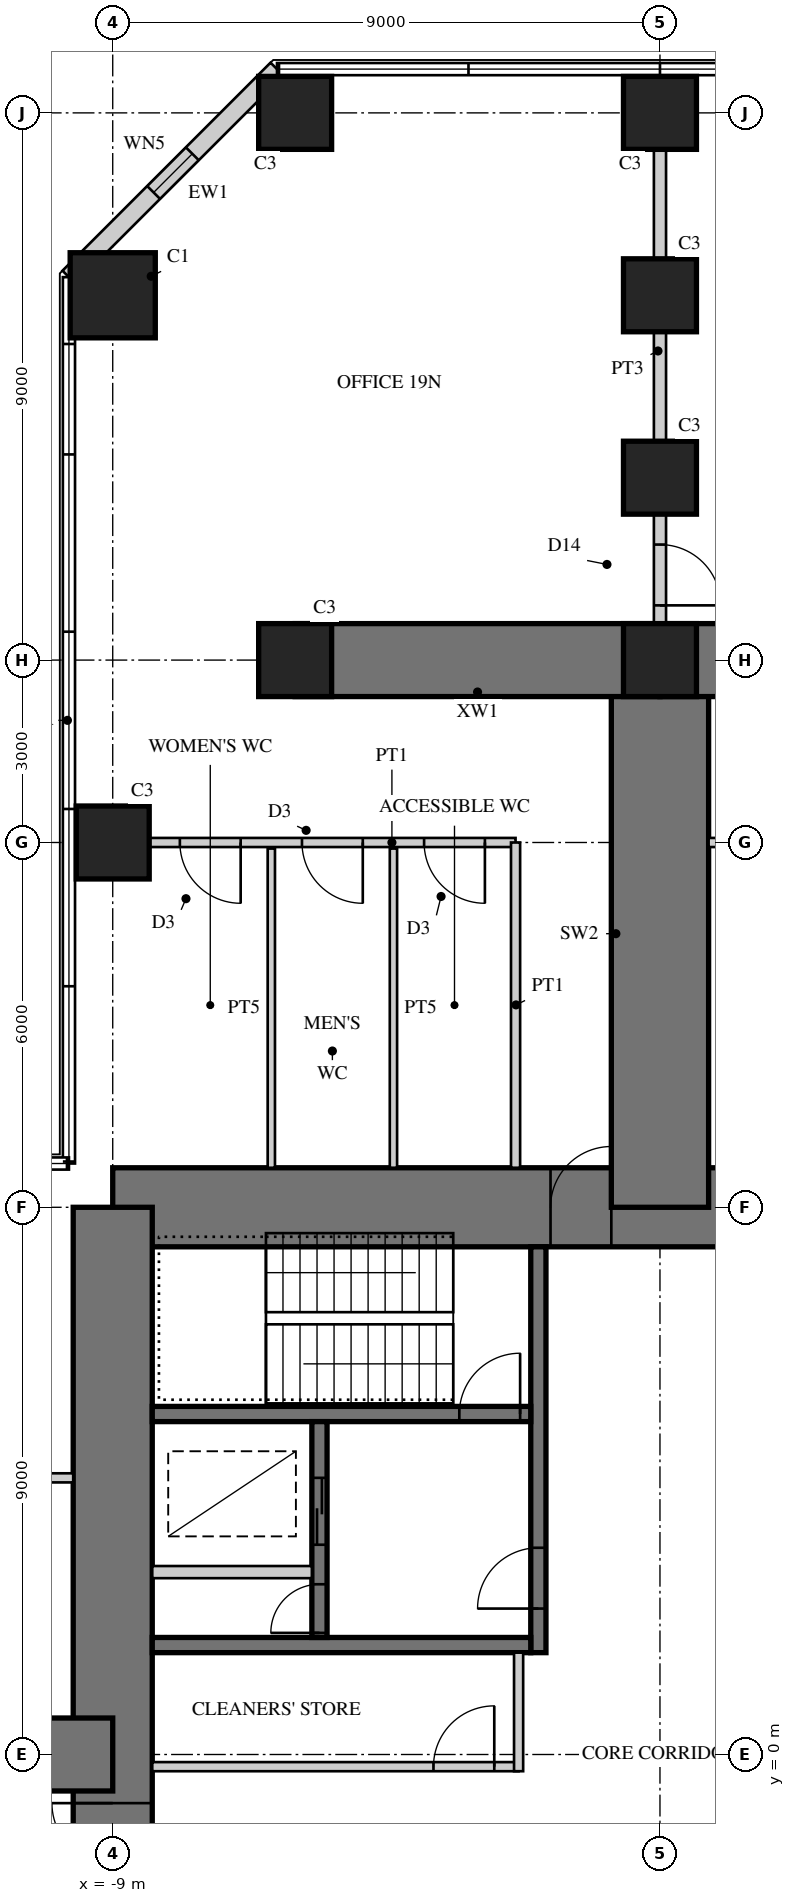
"""IFC4 building model, lengths in metres.
Left out: names, types, materials, properties, quantities, classifications, styles, units other than length and angle.
Written with IfcOpenShell. Run it as: python <this file> out.ifc"""

import sys

from ifc_helpers import new_model, si_unit, direction, frame, frame_2d, origin, origin_2d, place, context, subcontext, project, spatial, rectangle, hollow_rectangle, extrude, element, fill, save


model = new_model("IFC4")
c1 = context("Model", 3, precision=1e-05, world=origin(), true_north=direction((0.0, 1.0)))
c2 = subcontext(c1, "Body", "Model", "MODEL_VIEW")
j1 = project(units=[si_unit("LENGTHUNIT", "METRE"), si_unit("PLANEANGLEUNIT", "RADIAN")], contexts=[c1])
p1 = place(None, origin())
s1 = spatial("IfcSite", under=j1, at=p1, CompositionType="ELEMENT")
p2 = place(p1, origin())
s2 = spatial("IfcBuilding", under=s1, at=p2, CompositionType="ELEMENT")
p3 = place(p2, frame((0.0, 0.0, 79.5)))
s3 = spatial("IfcBuildingStorey", under=s2, at=p3, CompositionType="ELEMENT", Elevation=79.5)
p4 = place(p3, frame((9.0, 9.0, 0.0), z_axis=(0.0, 0.0, 1.0), x_axis=(-1.0, 0.0, 0.0)))
e1 = element("IfcWall", 1, at=p4, inside=s3, PredefinedType="SHEAR", context=c2, shape_type="SweptSolid", body=[
    extrude(rectangle(XDim=18.0, YDim=1.3, at=frame_2d((9.0, 0.0))), origin(), (0.0, 0.0, 1.0), 4.0),
])
p5 = place(p4, frame((9.8, 0.0, 0.0)))
e2 = element("IfcOpeningElement", 2, at=p5, cuts=e1, PredefinedType="OPENING", context=c2, shape_type="SweptSolid", body=[
    extrude(rectangle(XDim=1.0, YDim=2.4, at=frame_2d((0.5, 1.2))), frame((0.0, 0.66, 0.0), z_axis=(0.0, -1.0, 0.0), x_axis=(1.0, 0.0, 0.0)), (0.0, 0.0, 1.0), 1.32),
])
p6 = place(p3, frame((-9.0, 9.0, 0.0), z_axis=(0.0, 0.0, 1.0), x_axis=(0.0, -1.0, 0.0)))
e3 = element("IfcWall", 3, at=p6, inside=s3, PredefinedType="SHEAR", context=c2, shape_type="SweptSolid", body=[
    extrude(rectangle(XDim=18.0, YDim=1.3, at=frame_2d((9.0, 0.0))), origin(), (0.0, 0.0, 1.0), 4.0),
])
p7 = place(p6, frame((9.8, 0.0, 0.0)))
e4 = element("IfcOpeningElement", 4, at=p7, cuts=e3, PredefinedType="OPENING", context=c2, shape_type="SweptSolid", body=[
    extrude(rectangle(XDim=1.0, YDim=2.4, at=frame_2d((0.5, 1.2))), frame((0.0, 0.66, 0.0), z_axis=(0.0, -1.0, 0.0), x_axis=(1.0, 0.0, 0.0)), (0.0, 0.0, 1.0), 1.32),
])
p8 = place(p3, frame((-2.0, 1.675, 0.0), z_axis=(0.0, 0.0, 1.0), x_axis=(0.0, 1.0, 0.0)))
e5 = element("IfcWall", 5, at=p8, inside=s3, PredefinedType="SHEAR", context=c2, shape_type="SweptSolid", body=[
    extrude(rectangle(XDim=6.675, YDim=0.25, at=frame_2d((3.337, 0.0))), origin(), (0.0, 0.0, 1.0), 4.0),
])
p9 = place(p8, frame((0.725, 0.0, 0.0)))
e6 = element("IfcOpeningElement", 6, at=p9, cuts=e5, PredefinedType="OPENING", context=c2, shape_type="SweptSolid", body=[
    extrude(rectangle(XDim=1.0, YDim=2.1, at=frame_2d((0.5, 1.05))), frame((0.0, 0.135, 0.0), z_axis=(0.0, -1.0, 0.0), x_axis=(1.0, 0.0, 0.0)), (0.0, 0.0, 1.0), 0.27),
])
p10 = place(p3, frame((-2.125, 1.8, 0.0), z_axis=(0.0, 0.0, 1.0), x_axis=(-1.0, 0.0, 0.0)))
e7 = element("IfcWall", 7, at=p10, inside=s3, PredefinedType="SHEAR", context=c2, shape_type="SweptSolid", body=[
    extrude(rectangle(XDim=6.225, YDim=0.25, at=frame_2d((3.113, 0.0))), origin(), (0.0, 0.0, 1.0), 4.0),
])
p11 = place(p3, frame((-2.125, 5.6, 0.0), z_axis=(0.0, 0.0, 1.0), x_axis=(-1.0, 0.0, 0.0)))
e8 = element("IfcWall", 8, at=p11, inside=s3, PredefinedType="SHEAR", context=c2, shape_type="SweptSolid", body=[
    extrude(rectangle(XDim=6.225, YDim=0.25, at=frame_2d((3.113, 0.0))), origin(), (0.0, 0.0, 1.0), 4.0),
])
p12 = place(p11, frame((0.175, 0.0, 0.0)))
e9 = element("IfcOpeningElement", 9, at=p12, cuts=e8, PredefinedType="OPENING", context=c2, shape_type="SweptSolid", body=[
    extrude(rectangle(XDim=1.0, YDim=2.1, at=frame_2d((0.5, 1.05))), frame((0.0, 0.135, 0.0), z_axis=(0.0, -1.0, 0.0), x_axis=(1.0, 0.0, 0.0)), (0.0, 0.0, 1.0), 0.27),
])
p13 = place(p3, frame((-5.6, 1.925, 0.0), z_axis=(0.0, 0.0, 1.0), x_axis=(0.0, 1.0, 0.0)))
e10 = element("IfcWall", 10, at=p13, inside=s3, PredefinedType="SHEAR", context=c2, shape_type="SweptSolid", body=[
    extrude(rectangle(XDim=3.55, YDim=0.25, at=frame_2d((1.775, 0.0))), origin(), (0.0, 0.0, 1.0), 4.0),
])
p14 = place(p13, frame((1.525, 0.0, 0.0)))
e11 = element("IfcOpeningElement", 11, at=p14, cuts=e10, PredefinedType="OPENING", context=c2, shape_type="SweptSolid", body=[
    extrude(rectangle(XDim=1.1, YDim=2.2, at=frame_2d((0.55, 1.1))), frame((0.0, 0.135, 0.0), z_axis=(0.0, -1.0, 0.0), x_axis=(1.0, 0.0, 0.0)), (0.0, 0.0, 1.0), 0.27),
])
p15 = place(p13, frame((0.075, 0.0, 0.0)))
e12 = element("IfcOpeningElement", 12, at=p15, cuts=e10, PredefinedType="OPENING", context=c2, shape_type="SweptSolid", body=[
    extrude(rectangle(XDim=0.8, YDim=2.1, at=frame_2d((0.4, 1.05))), frame((0.0, 0.135, 0.0), z_axis=(0.0, -1.0, 0.0), x_axis=(1.0, 0.0, 0.0)), (0.0, 0.0, 1.0), 0.27),
])
p16 = place(p3, frame((-5.725, 3.0, 0.0), z_axis=(0.0, 0.0, 1.0), x_axis=(-1.0, 0.0, 0.0)))
e13 = element("IfcWall", 13, at=p16, inside=s3, PredefinedType="PARTITIONING", context=c2, shape_type="SweptSolid", body=[
    extrude(rectangle(XDim=2.625, YDim=0.2, at=frame_2d((1.312, 0.0))), origin(), (0.0, 0.0, 1.0), 4.0),
])
p17 = place(p3, frame((0.0, 9.0, 0.0), z_axis=(0.0, 0.0, 1.0), x_axis=(0.0, 1.0, 0.0)))
e14 = element("IfcWall", 14, at=p17, inside=s3, PredefinedType="SHEAR", context=c2, shape_type="SweptSolid", body=[
    extrude(rectangle(XDim=9.0, YDim=1.6, at=frame_2d((4.5, 0.0))), origin(), (0.0, 0.0, 1.0), 4.0),
])
for number, where, z_axis, x_axis in (
    (15, (0.0, 18.0, 0.0), (0.0, 0.0, 1.0), (-1.0, 0.0, 0.0)),
    (16, (0.0, 18.0, 0.0), (0.0, 0.0, 1.0), (1.0, 0.0, 0.0)),
):
    element("IfcWall", number, at=place(p3, frame(where, z_axis=z_axis, x_axis=x_axis)), inside=s3, PredefinedType="SHEAR", context=c2, shape_type="SweptSolid", body=[
        extrude(rectangle(XDim=6.0, YDim=1.2, at=frame_2d((3.0, 0.0))), origin(), (0.0, 0.0, 1.0), 4.0),
    ])
p18 = place(p3, frame((-9.0, 0.0, 0.0), z_axis=(0.0, 0.0, 1.0), x_axis=(-1.0, 0.0, 0.0)))
e17 = element("IfcWall", 17, at=p18, inside=s3, PredefinedType="SHEAR", context=c2, shape_type="SweptSolid", body=[
    extrude(rectangle(XDim=18.0, YDim=1.2, at=frame_2d((9.0, 0.0))), origin(), (0.0, 0.0, 1.0), 4.0),
])
p19 = place(p18, frame((9.9, 0.0, 0.0)))
e18 = element("IfcOpeningElement", 18, at=p19, cuts=e17, PredefinedType="OPENING", context=c2, shape_type="SweptSolid", body=[
    extrude(rectangle(XDim=1.0, YDim=2.2, at=frame_2d((0.5, 1.1))), frame((0.0, 0.61, 0.0), z_axis=(0.0, -1.0, 0.0), x_axis=(1.0, 0.0, 0.0)), (0.0, 0.0, 1.0), 1.22),
])
p20 = place(p3, frame((-9.0, 15.0, 0.0), z_axis=(0.0, 0.0, 1.0), x_axis=(1.0, 0.0, 0.0)))
e19 = element("IfcColumn", 19, at=p20, inside=s3, PredefinedType="COLUMN", context=c2, shape_type="SweptSolid", body=[
    extrude(rectangle(XDim=1.2, YDim=1.2, at=origin_2d()), origin(), (0.0, 0.0, 1.0), 4.0),
])
p21 = place(p3, frame((-9.0, 24.0, 0.0), z_axis=(0.0, 0.0, 1.0), x_axis=(1.0, 0.0, 0.0)))
e20 = element("IfcColumn", 20, at=p21, inside=s3, PredefinedType="COLUMN", context=c2, shape_type="SweptSolid", body=[
    extrude(rectangle(XDim=1.4, YDim=1.4, at=origin_2d()), origin(), (0.0, 0.0, 1.0), 4.0),
])
for number, where, z_axis, x_axis in (
    (21, (0.0, 27.0, 0.0), (0.0, 0.0, 1.0), (1.0, 0.0, 0.0)),
    (22, (-6.0, 27.0, 0.0), (0.0, 0.0, 1.0), (1.0, 0.0, 0.0)),
    (23, (0.0, 18.0, 0.0), (0.0, 0.0, 1.0), (1.0, 0.0, 0.0)),
    (24, (-6.0, 18.0, 0.0), (0.0, 0.0, 1.0), (1.0, 0.0, 0.0)),
    (25, (0.0, 21.0, 0.0), (0.0, 0.0, 1.0), (1.0, 0.0, 0.0)),
    (26, (0.0, 24.0, 0.0), (0.0, 0.0, 1.0), (1.0, 0.0, 0.0)),
):
    element("IfcColumn", number, at=place(p3, frame(where, z_axis=z_axis, x_axis=x_axis)), inside=s3, PredefinedType="COLUMN", context=c2, shape_type="SweptSolid", body=[
        extrude(rectangle(XDim=1.2, YDim=1.2, at=origin_2d()), origin(), (0.0, 0.0, 1.0), 4.0),
    ])
p22 = place(p3, frame((-6.298, 27.72, 0.0), z_axis=(0.0, 0.0, 1.0), x_axis=(-0.707106781187, -0.707106781187, 0.0)))
e27 = element("IfcWall", 27, at=p22, inside=s3, PredefinedType="SOLIDWALL", context=c2, shape_type="SweptSolid", body=[
    extrude(rectangle(XDim=4.839, YDim=0.3, at=frame_2d((2.419, 0.0))), origin(), (0.0, 0.0, 1.0), 3.8),
])
p23 = place(p22, frame((1.969, 0.0, 0.3)))
e28 = element("IfcOpeningElement", 28, at=p23, cuts=e27, PredefinedType="OPENING", context=c2, shape_type="SweptSolid", body=[
    extrude(rectangle(XDim=0.9, YDim=2.4, at=frame_2d((0.45, 1.2))), frame((0.0, 0.16, 0.0), z_axis=(0.0, -1.0, 0.0), x_axis=(1.0, 0.0, 0.0)), (0.0, 0.0, 1.0), 0.32),
])
p24 = place(p3, frame((-2.325, -0.2, 0.0), z_axis=(0.0, 0.0, 1.0), x_axis=(-1.0, 0.0, 0.0)))
e29 = element("IfcWall", 29, at=p24, inside=s3, PredefinedType="PARTITIONING", context=c2, shape_type="SweptSolid", body=[
    extrude(rectangle(XDim=6.025, YDim=0.15, at=frame_2d((3.013, 0.0))), origin(), (0.0, 0.0, 1.0), 3.8),
])
p25 = place(p24, frame((0.4, 0.0, 0.0)))
e30 = element("IfcOpeningElement", 30, at=p25, cuts=e29, PredefinedType="OPENING", context=c2, shape_type="SweptSolid", body=[
    extrude(rectangle(XDim=1.0, YDim=2.1, at=frame_2d((0.5, 1.05))), frame((0.0, 0.085, 0.0), z_axis=(0.0, -1.0, 0.0), x_axis=(1.0, 0.0, 0.0)), (0.0, 0.0, 1.0), 0.17),
])
p26 = place(p3, frame((-2.325, 1.675, 0.0), z_axis=(0.0, 0.0, 1.0), x_axis=(0.0, -1.0, 0.0)))
e31 = element("IfcWall", 31, at=p26, inside=s3, PredefinedType="PARTITIONING", context=c2, shape_type="SweptSolid", body=[
    extrude(rectangle(XDim=1.95, YDim=0.15, at=frame_2d((0.975, 0.0))), origin(), (0.0, 0.0, 1.0), 3.8),
])
p27 = place(p3, frame((-2.375, 15.0, 0.0), z_axis=(0.0, 0.0, 1.0), x_axis=(-1.0, 0.0, 0.0)))
e32 = element("IfcWall", 32, at=p27, inside=s3, PredefinedType="PARTITIONING", context=c2, shape_type="SweptSolid", body=[
    extrude(rectangle(XDim=6.025, YDim=0.15, at=frame_2d((3.012, 0.0))), origin(), (0.0, 0.0, 1.0), 2.95),
])
p28 = place(p27, frame((0.504, 0.0, 0.0)))
e33 = element("IfcOpeningElement", 33, at=p28, cuts=e32, PredefinedType="OPENING", context=c2, shape_type="SweptSolid", body=[
    extrude(rectangle(XDim=1.0, YDim=2.1, at=frame_2d((0.5, 1.05))), frame((0.0, 0.085, 0.0), z_axis=(0.0, -1.0, 0.0), x_axis=(1.0, 0.0, 0.0)), (0.0, 0.0, 1.0), 0.17),
])
p29 = place(p27, frame((2.512, 0.0, 0.0)))
e34 = element("IfcOpeningElement", 34, at=p29, cuts=e32, PredefinedType="OPENING", context=c2, shape_type="SweptSolid", body=[
    extrude(rectangle(XDim=1.0, YDim=2.1, at=frame_2d((0.5, 1.05))), frame((0.0, 0.085, 0.0), z_axis=(0.0, -1.0, 0.0), x_axis=(1.0, 0.0, 0.0)), (0.0, 0.0, 1.0), 0.17),
])
p30 = place(p27, frame((4.521, 0.0, 0.0)))
e35 = element("IfcOpeningElement", 35, at=p30, cuts=e32, PredefinedType="OPENING", context=c2, shape_type="SweptSolid", body=[
    extrude(rectangle(XDim=1.0, YDim=2.1, at=frame_2d((0.5, 1.05))), frame((0.0, 0.085, 0.0), z_axis=(0.0, -1.0, 0.0), x_axis=(1.0, 0.0, 0.0)), (0.0, 0.0, 1.0), 0.17),
])
p31 = place(p3, frame((-2.375, 9.65, 0.0), z_axis=(0.0, 0.0, 1.0), x_axis=(0.0, 1.0, 0.0)))
e36 = element("IfcWall", 36, at=p31, inside=s3, PredefinedType="PARTITIONING", context=c2, shape_type="SweptSolid", body=[
    extrude(rectangle(XDim=5.35, YDim=0.15, at=frame_2d((2.675, 0.0))), origin(), (0.0, 0.0, 1.0), 3.8),
])
for number, where, z_axis, x_axis in (
    (37, (-4.383, 9.65, 0.0), (0.0, 0.0, 1.0), (0.0, 1.0, 0.0)),
    (38, (-6.392, 9.65, 0.0), (0.0, 0.0, 1.0), (0.0, 1.0, 0.0)),
):
    element("IfcWall", number, at=place(p3, frame(where, z_axis=z_axis, x_axis=x_axis)), inside=s3, PredefinedType="PLUMBINGWALL", context=c2, shape_type="SweptSolid", body=[
        extrude(rectangle(XDim=5.25, YDim=0.12, at=frame_2d((2.625, 0.0))), origin(), (0.0, 0.0, 1.0), 3.8),
    ])
p32 = place(p3, frame((8.4, 15.0, 0.0), z_axis=(0.0, 0.0, 1.0), x_axis=(-1.0, 0.0, 0.0)))
e39 = element("IfcWall", 39, at=p32, inside=s3, PredefinedType="PARTITIONING", context=c2, shape_type="SweptSolid", body=[
    extrude(rectangle(XDim=7.6, YDim=0.15, at=frame_2d((3.8, 0.0))), origin(), (0.0, 0.0, 1.0), 2.95),
])
p33 = place(p32, frame((0.75, 0.0, 0.0)))
e40 = element("IfcOpeningElement", 40, at=p33, cuts=e39, PredefinedType="OPENING", context=c2, shape_type="SweptSolid", body=[
    extrude(rectangle(XDim=1.0, YDim=2.1, at=frame_2d((0.5, 1.05))), frame((0.0, 0.085, 0.0), z_axis=(0.0, -1.0, 0.0), x_axis=(1.0, 0.0, 0.0)), (0.0, 0.0, 1.0), 0.17),
])
p34 = place(p32, frame((3.25, 0.0, 0.0)))
e41 = element("IfcOpeningElement", 41, at=p34, cuts=e39, PredefinedType="OPENING", context=c2, shape_type="SweptSolid", body=[
    extrude(rectangle(XDim=1.0, YDim=2.1, at=frame_2d((0.5, 1.05))), frame((0.0, 0.085, 0.0), z_axis=(0.0, -1.0, 0.0), x_axis=(1.0, 0.0, 0.0)), (0.0, 0.0, 1.0), 0.17),
])
p35 = place(p32, frame((5.8, 0.0, 0.0)))
e42 = element("IfcOpeningElement", 42, at=p35, cuts=e39, PredefinedType="OPENING", context=c2, shape_type="SweptSolid", body=[
    extrude(rectangle(XDim=1.0, YDim=2.1, at=frame_2d((0.5, 1.05))), frame((0.0, 0.085, 0.0), z_axis=(0.0, -1.0, 0.0), x_axis=(1.0, 0.0, 0.0)), (0.0, 0.0, 1.0), 0.17),
])
p36 = place(p3, frame((-9.65, 4.55, 0.0), z_axis=(0.0, 0.0, 1.0), x_axis=(-1.0, 0.0, 0.0)))
e43 = element("IfcWall", 43, at=p36, inside=s3, PredefinedType="PARTITIONING", context=c2, shape_type="SweptSolid", body=[
    extrude(rectangle(XDim=5.25, YDim=0.15, at=frame_2d((2.625, 0.0))), origin(), (0.0, 0.0, 1.0), 3.8),
])
p37 = place(p3, frame((0.0, 18.0, 0.0), z_axis=(0.0, 0.0, 1.0), x_axis=(0.0, 1.0, 0.0)))
e44 = element("IfcWall", 44, at=p37, inside=s3, PredefinedType="SOLIDWALL", context=c2, shape_type="SweptSolid", body=[
    extrude(rectangle(XDim=3.0, YDim=0.2, at=frame_2d((1.5, 0.0))), origin(), (0.0, 0.0, 1.0), 3.8),
])
p38 = place(p37, frame((0.9, 0.0, 0.0)))
e45 = element("IfcOpeningElement", 45, at=p38, cuts=e44, PredefinedType="OPENING", context=c2, shape_type="SweptSolid", body=[
    extrude(rectangle(XDim=1.0, YDim=2.2, at=frame_2d((0.5, 1.1))), frame((0.0, 0.11, 0.0), z_axis=(0.0, -1.0, 0.0), x_axis=(1.0, 0.0, 0.0)), (0.0, 0.0, 1.0), 0.22),
])
p39 = place(p3, frame((0.0, 21.0, 0.0), z_axis=(0.0, 0.0, 1.0), x_axis=(0.0, 1.0, 0.0)))
e46 = element("IfcWall", 46, at=p39, inside=s3, PredefinedType="SOLIDWALL", context=c2, shape_type="SweptSolid", body=[
    extrude(rectangle(XDim=6.0, YDim=0.2, at=frame_2d((3.0, 0.0))), origin(), (0.0, 0.0, 1.0), 2.9),
])
p40 = place(p23, origin())
e47 = element("IfcWindow", 47, at=p40, inside=s3, PartitioningType="SINGLE_PANEL", PredefinedType="WINDOW", context=c2, shape_type="SweptSolid", body=[
    extrude(hollow_rectangle(XDim=0.9, YDim=2.4, WallThickness=0.06, at=frame_2d((0.45, 1.2))), frame((0.0, 0.03, 0.0), z_axis=(0.0, -1.0, 0.0), x_axis=(1.0, 0.0, 0.0)), (0.0, 0.0, 1.0), 0.06),
    extrude(rectangle(XDim=0.779, YDim=2.279, at=frame_2d((0.45, 1.2))), frame((0.0, 0.03, 0.0), z_axis=(0.0, -1.0, 0.0), x_axis=(1.0, 0.0, 0.0)), (0.0, 0.0, 1.0), 0.06),
])
fill(e28, e47)
p41 = place(p25, frame((1.0, 0.0, 0.0), z_axis=(0.0, 0.0, 1.0), x_axis=(-1.0, 0.0, 0.0)))
e48 = element("IfcDoor", 48, at=p41, inside=s3, OperationType="SINGLE_SWING_RIGHT", PredefinedType="DOOR", context=c2, shape_type="SweptSolid", body=[
    extrude(rectangle(XDim=1.0, YDim=2.1, at=frame_2d((0.5, 1.05))), frame((0.0, 0.025, 0.0), z_axis=(0.0, -1.0, 0.0), x_axis=(1.0, 0.0, 0.0)), (0.0, 0.0, 1.0), 0.05),
])
fill(e30, e48)
p42 = place(p28, origin())
e49 = element("IfcDoor", 49, at=p42, inside=s3, OperationType="SINGLE_SWING_LEFT", PredefinedType="DOOR", context=c2, shape_type="SweptSolid", body=[
    extrude(rectangle(XDim=1.0, YDim=2.1, at=frame_2d((0.5, 1.05))), frame((0.0, 0.025, 0.0), z_axis=(0.0, -1.0, 0.0), x_axis=(1.0, 0.0, 0.0)), (0.0, 0.0, 1.0), 0.05),
])
fill(e33, e49)
p43 = place(p29, origin())
e50 = element("IfcDoor", 50, at=p43, inside=s3, OperationType="SINGLE_SWING_LEFT", PredefinedType="DOOR", context=c2, shape_type="SweptSolid", body=[
    extrude(rectangle(XDim=1.0, YDim=2.1, at=frame_2d((0.5, 1.05))), frame((0.0, 0.025, 0.0), z_axis=(0.0, -1.0, 0.0), x_axis=(1.0, 0.0, 0.0)), (0.0, 0.0, 1.0), 0.05),
])
fill(e34, e50)
p44 = place(p30, origin())
e51 = element("IfcDoor", 51, at=p44, inside=s3, OperationType="SINGLE_SWING_LEFT", PredefinedType="DOOR", context=c2, shape_type="SweptSolid", body=[
    extrude(rectangle(XDim=1.0, YDim=2.1, at=frame_2d((0.5, 1.05))), frame((0.0, 0.025, 0.0), z_axis=(0.0, -1.0, 0.0), x_axis=(1.0, 0.0, 0.0)), (0.0, 0.0, 1.0), 0.05),
])
fill(e35, e51)
p45 = place(p38, frame((1.0, 0.0, 0.0), z_axis=(0.0, 0.0, 1.0), x_axis=(-1.0, 0.0, 0.0)))
e52 = element("IfcDoor", 52, at=p45, inside=s3, OperationType="SINGLE_SWING_RIGHT", PredefinedType="DOOR", context=c2, shape_type="SweptSolid", body=[
    extrude(rectangle(XDim=1.0, YDim=2.2, at=frame_2d((0.5, 1.1))), frame((0.0, 0.025, 0.0), z_axis=(0.0, -1.0, 0.0), x_axis=(1.0, 0.0, 0.0)), (0.0, 0.0, 1.0), 0.05),
])
fill(e45, e52)
p46 = place(p5, frame((1.0, 0.0, 0.0), z_axis=(0.0, 0.0, 1.0), x_axis=(-1.0, 0.0, 0.0)))
e53 = element("IfcDoor", 53, at=p46, inside=s3, OperationType="SINGLE_SWING_RIGHT", PredefinedType="DOOR", context=c2, shape_type="SweptSolid", body=[
    extrude(rectangle(XDim=1.0, YDim=2.4, at=frame_2d((0.5, 1.2))), frame((0.0, -0.005, 0.0), z_axis=(0.0, -1.0, 0.0), x_axis=(1.0, 0.0, 0.0)), (0.0, 0.0, 1.0), 0.05),
])
fill(e2, e53)
p47 = place(p7, frame((1.0, 0.0, 0.0), z_axis=(0.0, 0.0, 1.0), x_axis=(-1.0, 0.0, 0.0)))
e54 = element("IfcDoor", 54, at=p47, inside=s3, OperationType="SINGLE_SWING_RIGHT", PredefinedType="DOOR", context=c2, shape_type="SweptSolid", body=[
    extrude(rectangle(XDim=1.0, YDim=2.4, at=frame_2d((0.5, 1.2))), frame((0.0, -0.005, 0.0), z_axis=(0.0, -1.0, 0.0), x_axis=(1.0, 0.0, 0.0)), (0.0, 0.0, 1.0), 0.05),
])
fill(e4, e54)
p48 = place(p9, origin())
e55 = element("IfcDoor", 55, at=p48, inside=s3, OperationType="SINGLE_SWING_LEFT", PredefinedType="DOOR", context=c2, shape_type="SweptSolid", body=[
    extrude(rectangle(XDim=1.0, YDim=2.1, at=frame_2d((0.5, 1.05))), frame((0.0, 0.025, 0.0), z_axis=(0.0, -1.0, 0.0), x_axis=(1.0, 0.0, 0.0)), (0.0, 0.0, 1.0), 0.05),
])
fill(e6, e55)
p49 = place(p12, frame((1.0, 0.0, 0.0), z_axis=(0.0, 0.0, 1.0), x_axis=(-1.0, 0.0, 0.0)))
e56 = element("IfcDoor", 56, at=p49, inside=s3, OperationType="SINGLE_SWING_RIGHT", PredefinedType="DOOR", context=c2, shape_type="SweptSolid", body=[
    extrude(rectangle(XDim=1.0, YDim=2.1, at=frame_2d((0.5, 1.05))), frame((0.0, 0.025, 0.0), z_axis=(0.0, -1.0, 0.0), x_axis=(1.0, 0.0, 0.0)), (0.0, 0.0, 1.0), 0.05),
])
fill(e9, e56)
p50 = place(p14, origin())
e57 = element("IfcDoor", 57, at=p50, inside=s3, OperationType="DOUBLE_DOOR_SLIDING", PredefinedType="DOOR", context=c2, shape_type="SweptSolid", body=[
    extrude(rectangle(XDim=1.1, YDim=2.2, at=frame_2d((0.55, 1.1))), frame((0.0, 0.025, 0.0), z_axis=(0.0, -1.0, 0.0), x_axis=(1.0, 0.0, 0.0)), (0.0, 0.0, 1.0), 0.05),
])
fill(e11, e57)
p51 = place(p15, origin())
e58 = element("IfcDoor", 58, at=p51, inside=s3, OperationType="SINGLE_SWING_LEFT", PredefinedType="DOOR", context=c2, shape_type="SweptSolid", body=[
    extrude(rectangle(XDim=0.8, YDim=2.1, at=frame_2d((0.4, 1.05))), frame((0.0, 0.025, 0.0), z_axis=(0.0, -1.0, 0.0), x_axis=(1.0, 0.0, 0.0)), (0.0, 0.0, 1.0), 0.05),
])
fill(e12, e58)
save(model, sys.argv[1])
